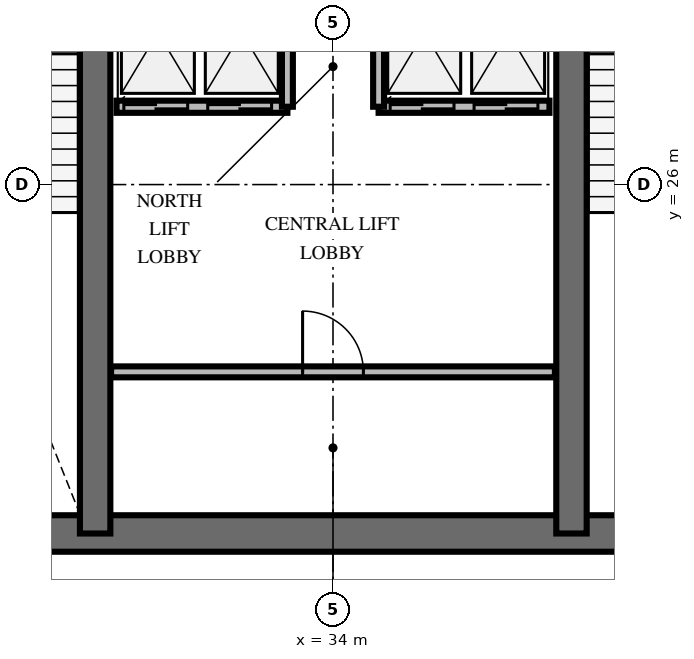
"""IFC4 building model, lengths in metres.
Left out: names, types, materials, properties, quantities, classifications, styles, units other than length and angle.
Written with IfcOpenShell. Run it as: python <this file> out.ifc"""

import sys

from ifc_helpers import new_model, si_unit, direction, frame, frame_2d, origin, place, context, subcontext, project, spatial, rectangle, extrude, element, fill, save


model = new_model("IFC4")
c1 = context("Model", 3, precision=1e-05, world=origin(), true_north=direction((0.0, 1.0)))
c2 = subcontext(c1, "Body", "Model", "MODEL_VIEW")
j1 = project(units=[si_unit("LENGTHUNIT", "METRE"), si_unit("PLANEANGLEUNIT", "RADIAN")], contexts=[c1])
p1 = place(None, origin())
s1 = spatial("IfcSite", under=j1, at=p1, CompositionType="ELEMENT")
p2 = place(p1, origin())
s2 = spatial("IfcBuilding", under=s1, at=p2, CompositionType="ELEMENT")
p3 = place(p2, frame((0.0, 0.0, 277.2)))
s3 = spatial("IfcBuildingStorey", under=s2, at=p3, CompositionType="ELEMENT", Elevation=277.2)
p4 = place(p3, frame((26.222, 20.262, 0.0), z_axis=(0.0, 0.0, 1.0), x_axis=(1.0, 0.0, 0.0)))
e1 = element("IfcWall", 1, at=p4, inside=s3, PredefinedType="SHEAR", context=c2, shape_type="SweptSolid", body=[
    extrude(rectangle(XDim=15.566, YDim=0.6, at=frame_2d((7.783, 0.0))), origin(), (0.0, 0.0, 1.0), 3.6),
])
for number, where, z_axis, x_axis in (
    (2, (30.088, 20.262, 0.0), (0.0, 0.0, 1.0), (0.0, 1.0, 0.0)),
    (3, (37.922, 20.262, 0.0), (0.0, 0.0, 1.0), (0.0, 1.0, 0.0)),
):
    element("IfcWall", number, at=place(p3, frame(where, z_axis=z_axis, x_axis=x_axis)), inside=s3, PredefinedType="SHEAR", context=c2, shape_type="SweptSolid", body=[
        extrude(rectangle(XDim=9.676, YDim=0.5, at=frame_2d((4.838, 0.0))), origin(), (0.0, 0.0, 1.0), 3.6),
    ])
p5 = place(p3, frame((30.35, 22.92, 0.0), z_axis=(0.0, 0.0, 1.0), x_axis=(1.0, 0.0, 0.0)))
e4 = element("IfcWall", 4, at=p5, inside=s3, PredefinedType="PARTITIONING", context=c2, shape_type="SweptSolid", body=[
    extrude(rectangle(XDim=7.3, YDim=0.18, at=frame_2d((3.65, 0.0))), origin(), (0.0, 0.0, 1.0), 2.46),
])
p6 = place(p5, frame((3.15, 0.0, 0.0)))
e5 = element("IfcOpeningElement", 5, at=p6, cuts=e4, PredefinedType="OPENING", context=c2, shape_type="SweptSolid", body=[
    extrude(rectangle(XDim=1.0, YDim=2.15, at=frame_2d((0.5, 1.075))), frame((0.0, 0.1, 0.0), z_axis=(0.0, -1.0, 0.0), x_axis=(1.0, 0.0, 0.0)), (0.0, 0.0, 1.0), 0.2),
])
p7 = place(p3, frame((30.44, 27.28, 0.0), z_axis=(0.0, 0.0, 1.0), x_axis=(1.0, 0.0, 0.0)))
e6 = element("IfcWall", 6, at=p7, inside=s3, PredefinedType="SOLIDWALL", context=c2, shape_type="SweptSolid", body=[
    extrude(rectangle(XDim=2.81, YDim=0.2, at=frame_2d((1.405, 0.0))), origin(), (0.0, 0.0, 1.0), 2.46),
])
p8 = place(p7, frame((0.12, 0.0, 0.0)))
e7 = element("IfcOpeningElement", 7, at=p8, cuts=e6, PredefinedType="OPENING", context=c2, shape_type="SweptSolid", body=[
    extrude(rectangle(XDim=1.05, YDim=2.1, at=frame_2d((0.525, 1.05))), frame((0.0, 0.11, 0.0), z_axis=(0.0, -1.0, 0.0), x_axis=(1.0, 0.0, 0.0)), (0.0, 0.0, 1.0), 0.22),
])
p9 = place(p7, frame((1.5, 0.0, 0.0)))
e8 = element("IfcOpeningElement", 8, at=p9, cuts=e6, PredefinedType="OPENING", context=c2, shape_type="SweptSolid", body=[
    extrude(rectangle(XDim=1.05, YDim=2.1, at=frame_2d((0.525, 1.05))), frame((0.0, 0.11, 0.0), z_axis=(0.0, -1.0, 0.0), x_axis=(1.0, 0.0, 0.0)), (0.0, 0.0, 1.0), 0.22),
])
p10 = place(p3, frame((33.25, 27.28, 0.0), z_axis=(0.0, 0.0, 1.0), x_axis=(0.0, 1.0, 0.0)))
e9 = element("IfcWall", 9, at=p10, inside=s3, PredefinedType="SOLIDWALL", context=c2, shape_type="SweptSolid", body=[
    extrude(rectangle(XDim=2.47, YDim=0.18, at=frame_2d((1.235, 0.0))), origin(), (0.0, 0.0, 1.0), 2.46),
])
p11 = place(p3, frame((34.75, 27.28, 0.0), z_axis=(0.0, 0.0, 1.0), x_axis=(1.0, 0.0, 0.0)))
e10 = element("IfcWall", 10, at=p11, inside=s3, PredefinedType="SOLIDWALL", context=c2, shape_type="SweptSolid", body=[
    extrude(rectangle(XDim=2.81, YDim=0.2, at=frame_2d((1.405, 0.0))), origin(), (0.0, 0.0, 1.0), 2.46),
])
p12 = place(p11, frame((0.19, 0.0, 0.0)))
e11 = element("IfcOpeningElement", 11, at=p12, cuts=e10, PredefinedType="OPENING", context=c2, shape_type="SweptSolid", body=[
    extrude(rectangle(XDim=1.05, YDim=2.1, at=frame_2d((0.525, 1.05))), frame((0.0, 0.11, 0.0), z_axis=(0.0, -1.0, 0.0), x_axis=(1.0, 0.0, 0.0)), (0.0, 0.0, 1.0), 0.22),
])
p13 = place(p11, frame((1.57, 0.0, 0.0)))
e12 = element("IfcOpeningElement", 12, at=p13, cuts=e10, PredefinedType="OPENING", context=c2, shape_type="SweptSolid", body=[
    extrude(rectangle(XDim=1.05, YDim=2.1, at=frame_2d((0.525, 1.05))), frame((0.0, 0.11, 0.0), z_axis=(0.0, -1.0, 0.0), x_axis=(1.0, 0.0, 0.0)), (0.0, 0.0, 1.0), 0.22),
])
p14 = place(p3, frame((34.75, 27.28, 0.0), z_axis=(0.0, 0.0, 1.0), x_axis=(0.0, 1.0, 0.0)))
e13 = element("IfcWall", 13, at=p14, inside=s3, PredefinedType="SOLIDWALL", context=c2, shape_type="SweptSolid", body=[
    extrude(rectangle(XDim=2.47, YDim=0.18, at=frame_2d((1.235, 0.0))), origin(), (0.0, 0.0, 1.0), 2.46),
])
p15 = place(p6, origin())
e14 = element("IfcDoor", 14, at=p15, inside=s3, OperationType="SINGLE_SWING_LEFT", PredefinedType="DOOR", context=c2, shape_type="SweptSolid", body=[
    extrude(rectangle(XDim=1.0, YDim=2.15, at=frame_2d((0.5, 1.075))), frame((0.0, 0.025, 0.0), z_axis=(0.0, -1.0, 0.0), x_axis=(1.0, 0.0, 0.0)), (0.0, 0.0, 1.0), 0.05),
])
fill(e5, e14)
p16 = place(p8, origin())
e15 = element("IfcDoor", 15, at=p16, inside=s3, OperationType="DOUBLE_DOOR_SLIDING", PredefinedType="USERDEFINED", context=c2, shape_type="SweptSolid", body=[
    extrude(rectangle(XDim=1.05, YDim=2.1, at=frame_2d((0.525, 1.05))), frame((0.0, 0.025, 0.0), z_axis=(0.0, -1.0, 0.0), x_axis=(1.0, 0.0, 0.0)), (0.0, 0.0, 1.0), 0.05),
])
fill(e7, e15)
p17 = place(p9, origin())
e16 = element("IfcDoor", 16, at=p17, inside=s3, OperationType="DOUBLE_DOOR_SLIDING", PredefinedType="USERDEFINED", context=c2, shape_type="SweptSolid", body=[
    extrude(rectangle(XDim=1.05, YDim=2.1, at=frame_2d((0.525, 1.05))), frame((0.0, 0.025, 0.0), z_axis=(0.0, -1.0, 0.0), x_axis=(1.0, 0.0, 0.0)), (0.0, 0.0, 1.0), 0.05),
])
fill(e8, e16)
p18 = place(p12, origin())
e17 = element("IfcDoor", 17, at=p18, inside=s3, OperationType="DOUBLE_DOOR_SLIDING", PredefinedType="USERDEFINED", context=c2, shape_type="SweptSolid", body=[
    extrude(rectangle(XDim=1.05, YDim=2.1, at=frame_2d((0.525, 1.05))), frame((0.0, 0.025, 0.0), z_axis=(0.0, -1.0, 0.0), x_axis=(1.0, 0.0, 0.0)), (0.0, 0.0, 1.0), 0.05),
])
fill(e11, e17)
p19 = place(p13, origin())
e18 = element("IfcDoor", 18, at=p19, inside=s3, OperationType="DOUBLE_DOOR_SLIDING", PredefinedType="USERDEFINED", context=c2, shape_type="SweptSolid", body=[
    extrude(rectangle(XDim=1.05, YDim=2.1, at=frame_2d((0.525, 1.05))), frame((0.0, 0.025, 0.0), z_axis=(0.0, -1.0, 0.0), x_axis=(1.0, 0.0, 0.0)), (0.0, 0.0, 1.0), 0.05),
])
fill(e12, e18)
save(model, sys.argv[1])
